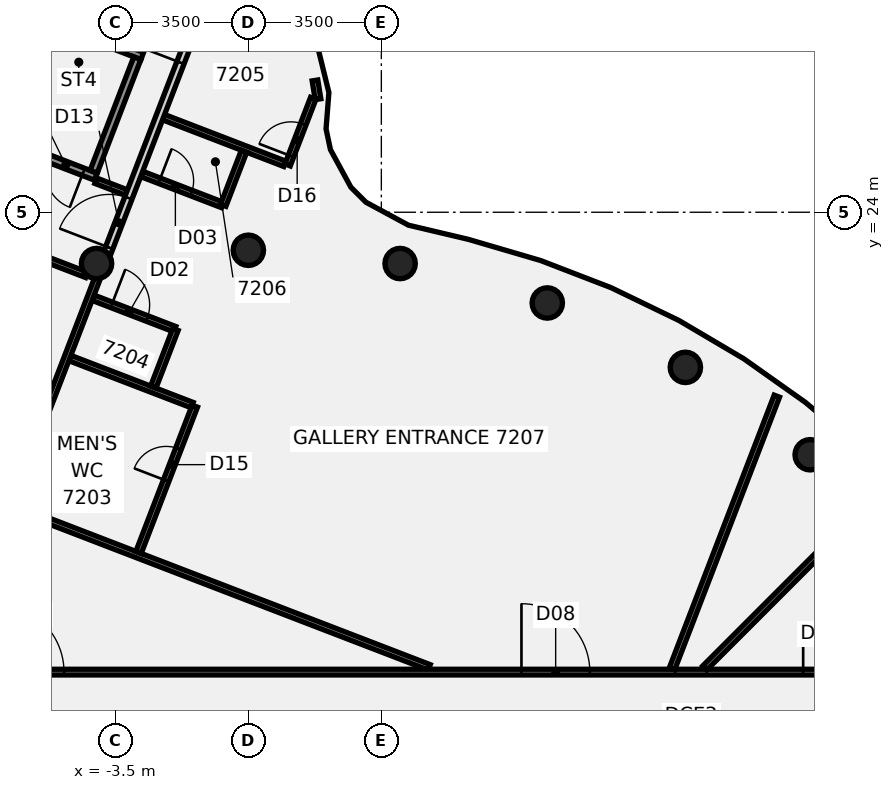
"""IFC4 building model, lengths in metres.
Left out: names, types, materials, properties, quantities, classifications, styles, units other than length and angle.
Written with IfcOpenShell. Run it as: python <this file> out.ifc"""

import sys

from ifc_helpers import new_model, si_unit, direction, frame, frame_2d, origin, origin_2d, place, context, subcontext, project, spatial, rectangle, circle, extrude, element, fill, save


model = new_model("IFC4")
c1 = context("Model", 3, precision=1e-05, world=origin(), true_north=direction((0.0, 1.0)))
c2 = subcontext(c1, "Body", "Model", "MODEL_VIEW")
j1 = project(units=[si_unit("LENGTHUNIT", "METRE"), si_unit("PLANEANGLEUNIT", "RADIAN")], contexts=[c1])
p1 = place(None, origin())
s1 = spatial("IfcSite", under=j1, at=p1, CompositionType="ELEMENT")
p2 = place(p1, origin())
s2 = spatial("IfcBuilding", under=s1, at=p2, CompositionType="ELEMENT")
p3 = place(p2, frame((0.0, 0.0, 287.4)))
s3 = spatial("IfcBuildingStorey", under=s2, at=p3, CompositionType="ELEMENT", Elevation=287.4)
for number, where, z_axis, x_axis in (
    (1, (14.784, 17.619, -0.2), (0.0, 0.0, 1.0), (1.0, 0.0, 0.0)),
    (2, (11.5, 19.919, -0.2), (0.0, 0.0, 1.0), (1.0, 0.0, 0.0)),
    (3, (7.866, 21.613, -0.2), (0.0, 0.0, 1.0), (1.0, 0.0, 0.0)),
    (4, (3.994, 22.651, -0.2), (0.0, 0.0, 1.0), (1.0, 0.0, 0.0)),
    (5, (0.0, 23.0, -0.2), (0.0, 0.0, 1.0), (1.0, 0.0, 0.0)),
    (6, (-3.994, 22.651, -0.2), (0.0, 0.0, 1.0), (1.0, 0.0, 0.0)),
):
    element("IfcColumn", number, at=place(p3, frame(where, z_axis=z_axis, x_axis=x_axis)), inside=s3, PredefinedType="COLUMN", context=c2, shape_type="SweptSolid", body=[
        extrude(circle(Radius=0.4, at=origin_2d()), origin(), (0.0, 0.0, 1.0), 7.0),
    ])
p4 = place(p3, frame((-15.381, 19.775, 0.0), z_axis=(0.0, 0.0, 1.0), x_axis=(0.933309154951, -0.359073838206, 0.0)))
e7 = element("IfcWall", 7, at=p4, inside=s3, PredefinedType="PARTITIONING", context=c2, shape_type="SweptSolid", body=[
    extrude(rectangle(XDim=21.581, YDim=0.15, at=frame_2d((10.79, 0.0))), origin(), (0.0, 0.0, 1.0), 6.1),
])
p5 = place(p3, frame((-8.107, 23.833, 0.0), z_axis=(0.0, 0.0, 1.0), x_axis=(0.933371527791, -0.358911675916, 0.0)))
e8 = element("IfcWall", 8, at=p5, inside=s3, PredefinedType="PARTITIONING", context=c2, shape_type="SweptSolid", body=[
    extrude(rectangle(XDim=4.126, YDim=0.15, at=frame_2d((2.063, 0.0))), origin(), (0.0, 0.0, 1.0), 6.1),
])
p6 = place(p5, frame((0.825, 0.0, 0.0)))
e9 = element("IfcOpeningElement", 9, at=p6, cuts=e8, PredefinedType="OPENING", context=c2, shape_type="SweptSolid", body=[
    extrude(rectangle(XDim=1.8, YDim=2.1, at=frame_2d((0.9, 1.05))), frame((0.0, 0.085, 0.0), z_axis=(0.0, -1.0, 0.0), x_axis=(1.0, 0.0, 0.0)), (0.0, 0.0, 1.0), 0.17),
])
p7 = place(p3, frame((-4.697, 20.164, 0.0), z_axis=(0.0, 0.0, 1.0), x_axis=(0.933325536288, -0.359031256735, 0.0)))
e10 = element("IfcWall", 10, at=p7, inside=s3, PredefinedType="PARTITIONING", context=c2, shape_type="SweptSolid", body=[
    extrude(rectangle(XDim=3.449, YDim=0.15, at=frame_2d((1.725, 0.0))), origin(), (0.0, 0.0, 1.0), 6.1),
])
p8 = place(p3, frame((-4.082, 21.749, 0.0), z_axis=(0.0, 0.0, 1.0), x_axis=(0.933258033254, -0.359206686139, 0.0)))
e11 = element("IfcWall", 11, at=p8, inside=s3, PredefinedType="PARTITIONING", context=c2, shape_type="SweptSolid", body=[
    extrude(rectangle(XDim=2.3, YDim=0.15, at=frame_2d((1.15, 0.0))), origin(), (0.0, 0.0, 1.0), 6.1),
])
p9 = place(p8, frame((0.52, 0.0, 0.0)))
e12 = element("IfcOpeningElement", 12, at=p9, cuts=e11, PredefinedType="OPENING", context=c2, shape_type="SweptSolid", body=[
    extrude(rectangle(XDim=1.0, YDim=2.1, at=frame_2d((0.5, 1.05))), frame((0.0, 0.085, 0.0), z_axis=(0.0, -1.0, 0.0), x_axis=(1.0, 0.0, 0.0)), (0.0, 0.0, 1.0), 0.17),
])
p10 = place(p3, frame((-4.012, 24.829, 0.0), z_axis=(0.0, 0.0, 1.0), x_axis=(0.933367559917, -0.358921994443, 0.0)))
e13 = element("IfcWall", 13, at=p10, inside=s3, PredefinedType="PARTITIONING", context=c2, shape_type="SweptSolid", body=[
    extrude(rectangle(XDim=0.86, YDim=0.15, at=frame_2d((0.43, 0.0))), origin(), (0.0, 0.0, 1.0), 6.1),
])
p11 = place(p3, frame((-2.802, 25.006, 0.0), z_axis=(0.0, 0.0, 1.0), x_axis=(0.933417507209, -0.358792080787, 0.0)))
e14 = element("IfcWall", 14, at=p11, inside=s3, PredefinedType="PARTITIONING", context=c2, shape_type="SweptSolid", body=[
    extrude(rectangle(XDim=2.275, YDim=0.15, at=frame_2d((1.137, 0.0))), origin(), (0.0, 0.0, 1.0), 6.1),
])
p12 = place(p11, frame((0.495, 0.0, 0.0)))
e15 = element("IfcOpeningElement", 15, at=p12, cuts=e14, PredefinedType="OPENING", context=c2, shape_type="SweptSolid", body=[
    extrude(rectangle(XDim=0.9, YDim=2.1, at=frame_2d((0.45, 1.05))), frame((0.0, 0.085, 0.0), z_axis=(0.0, -1.0, 0.0), x_axis=(1.0, 0.0, 0.0)), (0.0, 0.0, 1.0), 0.17),
])
p13 = place(p3, frame((-2.228, 26.5, 0.0), z_axis=(0.0, 0.0, 1.0), x_axis=(0.933277417712, -0.359156319156, 0.0)))
e16 = element("IfcWall", 16, at=p13, inside=s3, PredefinedType="PARTITIONING", context=c2, shape_type="SweptSolid", body=[
    extrude(rectangle(XDim=3.415, YDim=0.15, at=frame_2d((1.708, 0.0))), origin(), (0.0, 0.0, 1.0), 6.1),
])
p14 = place(p3, frame((-17.065, 11.9, 0.0), z_axis=(0.0, 0.0, 1.0), x_axis=(1.0, 0.0, 0.0)))
e17 = element("IfcWall", 17, at=p14, inside=s3, PredefinedType="PARTITIONING", context=c2, shape_type="SweptSolid", body=[
    extrude(rectangle(XDim=34.165, YDim=0.15, at=frame_2d((17.083, 0.0))), origin(), (0.0, 0.0, 1.0), 6.1),
])
p15 = place(p14, frame((24.252, 0.0, 0.0)))
e18 = element("IfcOpeningElement", 18, at=p15, cuts=e17, PredefinedType="OPENING", context=c2, shape_type="SweptSolid", body=[
    extrude(rectangle(XDim=1.8, YDim=2.1, at=frame_2d((0.9, 1.05))), frame((0.0, 0.085, 0.0), z_axis=(0.0, -1.0, 0.0), x_axis=(1.0, 0.0, 0.0)), (0.0, 0.0, 1.0), 0.17),
])
p16 = place(p14, frame((31.665, 0.0, 0.0)))
e19 = element("IfcOpeningElement", 19, at=p16, cuts=e17, PredefinedType="OPENING", context=c2, shape_type="SweptSolid", body=[
    extrude(rectangle(XDim=0.9, YDim=2.1, at=frame_2d((0.45, 1.05))), frame((0.0, 0.085, 0.0), z_axis=(0.0, -1.0, 0.0), x_axis=(1.0, 0.0, 0.0)), (0.0, 0.0, 1.0), 0.17),
])
p17 = place(p14, frame((10.415, 0.0, 0.0)))
e20 = element("IfcOpeningElement", 20, at=p17, cuts=e17, PredefinedType="OPENING", context=c2, shape_type="SweptSolid", body=[
    extrude(rectangle(XDim=1.8, YDim=2.1, at=frame_2d((0.9, 1.05))), frame((0.0, 0.085, 0.0), z_axis=(0.0, -1.0, 0.0), x_axis=(1.0, 0.0, 0.0)), (0.0, 0.0, 1.0), 0.17),
])
p18 = place(p3, frame((12.01, 12.01, 0.0), z_axis=(0.0, 0.0, 1.0), x_axis=(0.707106781187, 0.707106781187, 0.0)))
e21 = element("IfcWall", 21, at=p18, inside=s3, PredefinedType="PARTITIONING", context=c2, shape_type="SweptSolid", body=[
    extrude(rectangle(XDim=6.691, YDim=0.15, at=frame_2d((3.345, 0.0))), origin(), (0.0, 0.0, 1.0), 6.1),
])
p19 = place(p3, frame((-6.247, 16.346, 0.0), z_axis=(0.0, 0.0, 1.0), x_axis=(0.359265090685, 0.933235551517, 0.0)))
e22 = element("IfcWall", 22, at=p19, inside=s3, PredefinedType="PARTITIONING", context=c2, shape_type="SweptSolid", body=[
    extrude(rectangle(XDim=6.463, YDim=0.15, at=frame_2d((3.231, 0.0))), origin(), (0.0, 0.0, 1.0), 6.1),
])
p20 = place(p3, frame((-3.764, 22.797, 0.0), z_axis=(0.0, 0.0, 1.0), x_axis=(0.359256035464, 0.93323903743, 0.0)))
e23 = element("IfcWall", 23, at=p20, inside=s3, PredefinedType="PARTITIONING", context=c2, shape_type="SweptSolid", body=[
    extrude(rectangle(XDim=7.206, YDim=0.2, at=frame_2d((3.603, 0.0))), origin(), (0.0, 0.0, 1.0), 6.1),
])
p21 = place(p20, frame((0.292, 0.0, 0.0)))
e24 = element("IfcOpeningElement", 24, at=p21, cuts=e23, PredefinedType="OPENING", context=c2, shape_type="SweptSolid", body=[
    extrude(rectangle(XDim=1.4, YDim=2.1, at=frame_2d((0.7, 1.05))), frame((0.0, 0.11, 0.0), z_axis=(0.0, -1.0, 0.0), x_axis=(1.0, 0.0, 0.0)), (0.0, 0.0, 1.0), 0.22),
])
p22 = place(p20, frame((5.507, 0.0, 0.0)))
e25 = element("IfcOpeningElement", 25, at=p22, cuts=e23, PredefinedType="OPENING", context=c2, shape_type="SweptSolid", body=[
    extrude(rectangle(XDim=0.9, YDim=2.1, at=frame_2d((0.45, 1.05))), frame((0.0, 0.11, 0.0), z_axis=(0.0, -1.0, 0.0), x_axis=(1.0, 0.0, 0.0)), (0.0, 0.0, 1.0), 0.22),
])
p23 = place(p3, frame((-2.889, 15.049, 0.0), z_axis=(0.0, 0.0, 1.0), x_axis=(0.359082195205, 0.933305939704, 0.0)))
e26 = element("IfcWall", 26, at=p23, inside=s3, PredefinedType="PARTITIONING", context=c2, shape_type="SweptSolid", body=[
    extrude(rectangle(XDim=4.125, YDim=0.15, at=frame_2d((2.062, 0.0))), origin(), (0.0, 0.0, 1.0), 6.1),
])
p24 = place(p23, frame((2.025, 0.0, 0.0)))
e27 = element("IfcOpeningElement", 27, at=p24, cuts=e26, PredefinedType="OPENING", context=c2, shape_type="SweptSolid", body=[
    extrude(rectangle(XDim=0.9, YDim=2.1, at=frame_2d((0.45, 1.05))), frame((0.0, 0.085, 0.0), z_axis=(0.0, -1.0, 0.0), x_axis=(1.0, 0.0, 0.0)), (0.0, 0.0, 1.0), 0.17),
])
p25 = place(p3, frame((1.033, 25.245, 0.0), z_axis=(0.0, 0.0, 1.0), x_axis=(0.359048792094, 0.933318790605, 0.0)))
e28 = element("IfcWall", 28, at=p25, inside=s3, PredefinedType="PARTITIONING", context=c2, shape_type="SweptSolid", body=[
    extrude(rectangle(XDim=1.877, YDim=0.15, at=frame_2d((0.939, 0.0))), origin(), (0.0, 0.0, 1.0), 6.1),
])
p26 = place(p25, frame((0.25, 0.0, 0.0)))
e29 = element("IfcOpeningElement", 29, at=p26, cuts=e28, PredefinedType="OPENING", context=c2, shape_type="SweptSolid", body=[
    extrude(rectangle(XDim=0.9, YDim=2.1, at=frame_2d((0.45, 1.05))), frame((0.0, 0.085, 0.0), z_axis=(0.0, -1.0, 0.0), x_axis=(1.0, 0.0, 0.0)), (0.0, 0.0, 1.0), 0.17),
])
p27 = place(p3, frame((-2.5, 19.4, 0.0), z_axis=(0.0, 0.0, 1.0), x_axis=(0.358918648281, 0.93336884666, 0.0)))
e30 = element("IfcWall", 30, at=p27, inside=s3, PredefinedType="PARTITIONING", context=c2, shape_type="SweptSolid", body=[
    extrude(rectangle(XDim=1.624, YDim=0.15, at=frame_2d((0.812, 0.0))), origin(), (0.0, 0.0, 1.0), 6.1),
])
p28 = place(p3, frame((-0.66, 24.183, 0.0), z_axis=(0.0, 0.0, 1.0), x_axis=(0.358989808999, 0.933341479328, 0.0)))
e31 = element("IfcWall", 31, at=p28, inside=s3, PredefinedType="PARTITIONING", context=c2, shape_type="SweptSolid", body=[
    extrude(rectangle(XDim=1.525, YDim=0.15, at=frame_2d((0.762, 0.0))), origin(), (0.0, 0.0, 1.0), 6.1),
])
p29 = place(p3, frame((11.147, 11.984, 0.0), z_axis=(0.0, 0.0, 1.0), x_axis=(0.358991844547, 0.933340696396, 0.0)))
e32 = element("IfcWall", 32, at=p29, inside=s3, PredefinedType="PARTITIONING", context=c2, shape_type="SweptSolid", body=[
    extrude(rectangle(XDim=7.69, YDim=0.15, at=frame_2d((3.845, 0.0))), origin(), (0.0, 0.0, 1.0), 6.1),
])
p30 = place(p3, frame((1.833, 26.975, 0.0), z_axis=(0.0, 0.0, 1.0), x_axis=(-0.159723843543, 0.987161736396, 0.0)))
e33 = element("IfcWall", 33, at=p30, inside=s3, PredefinedType="PARTITIONING", context=c2, shape_type="SweptSolid", body=[
    extrude(rectangle(XDim=0.5, YDim=0.15, at=frame_2d((0.25, 0.0))), origin(), (0.0, 0.0, 1.0), 6.1),
])
p31 = place(p3, frame((-4.013, 24.937, -0.2), z_axis=(0.0, 0.0, 1.0), x_axis=(-0.933310853346, 0.359069423686, 0.0)))
e34 = element("IfcWall", 34, at=p31, inside=s3, PredefinedType="SHEAR", context=c2, shape_type="SweptSolid", body=[
    extrude(rectangle(XDim=6.7, YDim=0.2, at=frame_2d((3.35, 0.0))), origin(), (0.0, 0.0, 1.0), 6.3),
])
p32 = place(p31, frame((0.35, 0.0, 0.0)))
e35 = element("IfcOpeningElement", 35, at=p32, cuts=e34, PredefinedType="OPENING", context=c2, shape_type="SweptSolid", body=[
    extrude(rectangle(XDim=1.0, YDim=2.1, at=frame_2d((0.5, 1.05))), frame((0.0, 0.11, 0.0), z_axis=(0.0, -1.0, 0.0), x_axis=(1.0, 0.0, 0.0)), (0.0, 0.0, 1.0), 0.22),
])
p33 = place(p3, frame((-2.792, 28.11, -0.2), z_axis=(0.0, 0.0, 1.0), x_axis=(-0.933310853346, 0.359069423686, 0.0)))
e36 = element("IfcWall", 36, at=p33, inside=s3, PredefinedType="SHEAR", context=c2, shape_type="SweptSolid", body=[
    extrude(rectangle(XDim=6.7, YDim=0.2, at=frame_2d((3.35, 0.0))), origin(), (0.0, 0.0, 1.0), 6.3),
])
p34 = place(p3, frame((-2.921, 28.053, -0.2), z_axis=(0.0, 0.0, 1.0), x_axis=(-0.359111998838, -0.933294472442, 0.0)))
e37 = element("IfcWall", 37, at=p34, inside=s3, PredefinedType="SHEAR", context=c2, shape_type="SweptSolid", body=[
    extrude(rectangle(XDim=3.2, YDim=0.2, at=frame_2d((1.6, 0.0))), origin(), (0.0, 0.0, 1.0), 7.0),
])
p35 = place(p9, frame((1.0, 0.0, 0.0), z_axis=(0.0, 0.0, 1.0), x_axis=(-1.0, 0.0, 0.0)))
e38 = element("IfcDoor", 38, at=p35, inside=s3, OperationType="SINGLE_SWING_LEFT", PredefinedType="DOOR", context=c2, shape_type="SweptSolid", body=[
    extrude(rectangle(XDim=1.0, YDim=2.1, at=frame_2d((0.5, 1.05))), frame((0.0, 0.025, 0.0), z_axis=(0.0, -1.0, 0.0), x_axis=(1.0, 0.0, 0.0)), (0.0, 0.0, 1.0), 0.05),
])
fill(e12, e38)
p36 = place(p12, origin())
e39 = element("IfcDoor", 39, at=p36, inside=s3, OperationType="SINGLE_SWING_RIGHT", PredefinedType="DOOR", context=c2, shape_type="SweptSolid", body=[
    extrude(rectangle(XDim=0.9, YDim=2.1, at=frame_2d((0.45, 1.05))), frame((0.0, 0.025, 0.0), z_axis=(0.0, -1.0, 0.0), x_axis=(1.0, 0.0, 0.0)), (0.0, 0.0, 1.0), 0.05),
])
fill(e15, e39)
p37 = place(p15, frame((1.8, 0.0, 0.0), z_axis=(0.0, 0.0, 1.0), x_axis=(-1.0, 0.0, 0.0)))
e40 = element("IfcDoor", 40, at=p37, inside=s3, OperationType="DOUBLE_DOOR_SINGLE_SWING", PredefinedType="DOOR", context=c2, shape_type="SweptSolid", body=[
    extrude(rectangle(XDim=1.8, YDim=2.1, at=frame_2d((0.9, 1.05))), frame((0.0, 0.025, 0.0), z_axis=(0.0, -1.0, 0.0), x_axis=(1.0, 0.0, 0.0)), (0.0, 0.0, 1.0), 0.05),
])
fill(e18, e40)
p38 = place(p16, origin())
e41 = element("IfcDoor", 41, at=p38, inside=s3, OperationType="SINGLE_SWING_LEFT", PredefinedType="DOOR", context=c2, shape_type="SweptSolid", body=[
    extrude(rectangle(XDim=0.9, YDim=2.1, at=frame_2d((0.45, 1.05))), frame((0.0, 0.025, 0.0), z_axis=(0.0, -1.0, 0.0), x_axis=(1.0, 0.0, 0.0)), (0.0, 0.0, 1.0), 0.05),
])
fill(e19, e41)
p39 = place(p17, origin())
e42 = element("IfcDoor", 42, at=p39, inside=s3, OperationType="DOUBLE_DOOR_SINGLE_SWING", PredefinedType="DOOR", context=c2, shape_type="SweptSolid", body=[
    extrude(rectangle(XDim=1.8, YDim=2.1, at=frame_2d((0.9, 1.05))), frame((0.0, 0.025, 0.0), z_axis=(0.0, -1.0, 0.0), x_axis=(1.0, 0.0, 0.0)), (0.0, 0.0, 1.0), 0.05),
])
fill(e20, e42)
p40 = place(p21, frame((1.4, 0.0, 0.0), z_axis=(0.0, 0.0, 1.0), x_axis=(-1.0, 0.0, 0.0)))
e43 = element("IfcDoor", 43, at=p40, inside=s3, OperationType="DOUBLE_DOOR_SINGLE_SWING", PredefinedType="DOOR", context=c2, shape_type="SweptSolid", body=[
    extrude(rectangle(XDim=1.4, YDim=2.1, at=frame_2d((0.7, 1.05))), frame((0.0, 0.025, 0.0), z_axis=(0.0, -1.0, 0.0), x_axis=(1.0, 0.0, 0.0)), (0.0, 0.0, 1.0), 0.05),
])
fill(e24, e43)
p41 = place(p22, origin())
e44 = element("IfcDoor", 44, at=p41, inside=s3, OperationType="SINGLE_SWING_LEFT", PredefinedType="DOOR", context=c2, shape_type="SweptSolid", body=[
    extrude(rectangle(XDim=0.9, YDim=2.1, at=frame_2d((0.45, 1.05))), frame((0.0, 0.025, 0.0), z_axis=(0.0, -1.0, 0.0), x_axis=(1.0, 0.0, 0.0)), (0.0, 0.0, 1.0), 0.05),
])
fill(e25, e44)
p42 = place(p24, origin())
e45 = element("IfcDoor", 45, at=p42, inside=s3, OperationType="SINGLE_SWING_LEFT", PredefinedType="DOOR", context=c2, shape_type="SweptSolid", body=[
    extrude(rectangle(XDim=0.9, YDim=2.1, at=frame_2d((0.45, 1.05))), frame((0.0, 0.025, 0.0), z_axis=(0.0, -1.0, 0.0), x_axis=(1.0, 0.0, 0.0)), (0.0, 0.0, 1.0), 0.05),
])
fill(e27, e45)
p43 = place(p26, origin())
e46 = element("IfcDoor", 46, at=p43, inside=s3, OperationType="SINGLE_SWING_RIGHT", PredefinedType="DOOR", context=c2, shape_type="SweptSolid", body=[
    extrude(rectangle(XDim=0.9, YDim=2.1, at=frame_2d((0.45, 1.05))), frame((0.0, 0.025, 0.0), z_axis=(0.0, -1.0, 0.0), x_axis=(1.0, 0.0, 0.0)), (0.0, 0.0, 1.0), 0.05),
])
fill(e29, e46)
p44 = place(p32, origin())
e47 = element("IfcDoor", 47, at=p44, inside=s3, OperationType="SINGLE_SWING_LEFT", PredefinedType="DOOR", context=c2, shape_type="SweptSolid", body=[
    extrude(rectangle(XDim=1.0, YDim=2.1, at=frame_2d((0.5, 1.05))), frame((0.0, 0.025, 0.0), z_axis=(0.0, -1.0, 0.0), x_axis=(1.0, 0.0, 0.0)), (0.0, 0.0, 1.0), 0.05),
])
fill(e35, e47)
save(model, sys.argv[1])
